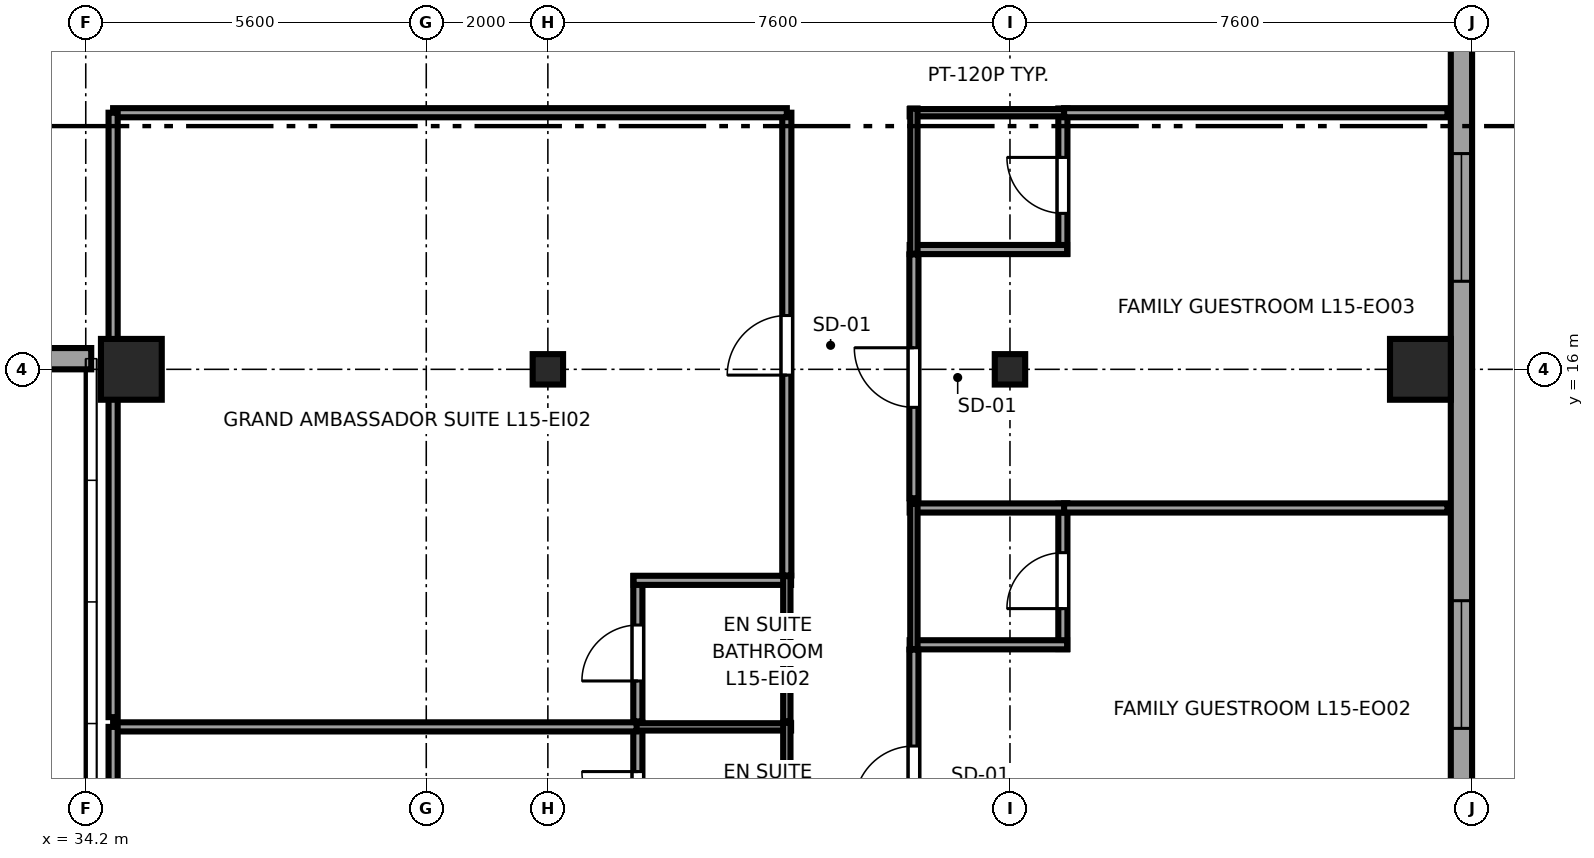
"""IFC4 building model, lengths in metres.
Left out: names, types, materials, properties, quantities, classifications, styles, units other than length and angle.
Written with IfcOpenShell. Run it as: python <this file> out.ifc"""

import sys

from ifc_helpers import new_model, si_unit, direction, frame, frame_2d, origin, origin_2d, place, context, subcontext, project, spatial, rectangle, i_section, extrude, source, transform, mapped, element, fill, save


model = new_model("IFC4")
c1 = context("Model", 3, precision=1e-05, world=origin(), true_north=direction((0.0, 1.0)))
c2 = subcontext(c1, "Body", "Model", "MODEL_VIEW")
j1 = project(units=[si_unit("LENGTHUNIT", "METRE"), si_unit("PLANEANGLEUNIT", "RADIAN")], contexts=[c1])
p1 = place(None, origin())
s1 = spatial("IfcSite", under=j1, at=p1, CompositionType="ELEMENT")
p2 = place(p1, origin())
s2 = spatial("IfcBuilding", under=s1, at=p2, CompositionType="ELEMENT")
p3 = place(p2, frame((0.0, 0.0, 63.95)))
s3 = spatial("IfcBuildingStorey", under=s2, at=p3, CompositionType="ELEMENT", Elevation=63.95)
m1 = source(origin(), c2, "Body", "SweptSolid", [
    extrude(rectangle(XDim=1.0, YDim=1.0, at=origin_2d()), origin(), (0.0, 0.0, 1.0), 3.55),
])
p4 = place(p3, frame((34.95, 16.0, 0.0), z_axis=(0.0, 0.0, 1.0), x_axis=(1.0, 0.0, 0.0)))
e1 = element("IfcColumn", 1, at=p4, inside=s3, PredefinedType="COLUMN", context=c2, shape_type="MappedRepresentation", body=[
    mapped(m1, transform((0.0, 0.0, 0.0), x_axis=(1.0, 0.0, 0.0), y_axis=(0.0, 1.0, 0.0), z_axis=(0.0, 0.0, 1.0), scale=1.0)),
])
m2 = source(origin(), c2, "Body", "SweptSolid", [
    extrude(i_section(OverallWidth=0.5, OverallDepth=0.5, WebThickness=0.028, FlangeThickness=0.045, at=origin_2d()), origin(), (0.0, 0.0, 1.0), 3.55),
])
for number, where, z_axis, x_axis in (
    (2, (41.8, 16.0, 0.0), (0.0, 0.0, 1.0), (1.0, 0.0, 0.0)),
    (3, (49.4, 16.0, 0.0), (0.0, 0.0, 1.0), (1.0, 0.0, 0.0)),
):
    element("IfcColumn", number, at=place(p3, frame(where, z_axis=z_axis, x_axis=x_axis)), inside=s3, PredefinedType="COLUMN", context=c2, shape_type="MappedRepresentation", body=[
        mapped(m2, transform((0.0, 0.0, 0.0), x_axis=(1.0, 0.0, 0.0), y_axis=(0.0, 1.0, 0.0), z_axis=(0.0, 0.0, 1.0), scale=1.0)),
    ])
p5 = place(p3, frame((56.15, 16.0, 0.0), z_axis=(0.0, 0.0, 1.0), x_axis=(1.0, 0.0, 0.0)))
e4 = element("IfcColumn", 4, at=p5, inside=s3, PredefinedType="COLUMN", context=c2, shape_type="MappedRepresentation", body=[
    mapped(m1, transform((0.0, 0.0, 0.0), x_axis=(1.0, 0.0, 0.0), y_axis=(0.0, 1.0, 0.0), z_axis=(0.0, 0.0, 1.0), scale=1.0)),
])
p6 = place(p3, frame((22.71, 16.175, 0.0), z_axis=(0.0, 0.0, 1.0), x_axis=(1.0, 0.0, 0.0)))
e5 = element("IfcWall", 5, at=p6, inside=s3, PredefinedType="SOLIDWALL", context=c2, shape_type="SweptSolid", body=[
    extrude(rectangle(XDim=11.58, YDim=0.35, at=frame_2d((5.79, 0.0))), origin(), (0.0, 0.0, 1.0), 2.748),
])
p7 = place(p6, frame((2.145, 0.0, 0.68)))
e6 = element("IfcOpeningElement", 6, at=p7, cuts=e5, PredefinedType="OPENING", context=c2, shape_type="SweptSolid", body=[
    extrude(rectangle(XDim=2.1, YDim=1.9, at=frame_2d((1.05, 0.95))), frame((0.0, 0.185, 0.0), z_axis=(0.0, -1.0, 0.0), x_axis=(1.0, 0.0, 0.0)), (0.0, 0.0, 1.0), 0.37),
])
p8 = place(p6, frame((7.335, 0.0, 0.68)))
e7 = element("IfcOpeningElement", 7, at=p8, cuts=e5, PredefinedType="OPENING", context=c2, shape_type="SweptSolid", body=[
    extrude(rectangle(XDim=2.1, YDim=1.9, at=frame_2d((1.05, 0.95))), frame((0.0, 0.185, 0.0), z_axis=(0.0, -1.0, 0.0), x_axis=(1.0, 0.0, 0.0)), (0.0, 0.0, 1.0), 0.37),
])
p9 = place(p3, frame((56.825, 4.617, 0.0), z_axis=(0.0, 0.0, 1.0), x_axis=(0.0, 1.0, 0.0)))
e8 = element("IfcWall", 8, at=p9, inside=s3, PredefinedType="SOLIDWALL", context=c2, shape_type="SweptSolid", body=[
    extrude(rectangle(XDim=36.766, YDim=0.35, at=frame_2d((18.383, 0.0))), origin(), (0.0, 0.0, 1.0), 3.37),
])
p10 = place(p9, frame((5.478, 0.0, 0.68)))
e9 = element("IfcOpeningElement", 9, at=p10, cuts=e8, PredefinedType="OPENING", context=c2, shape_type="SweptSolid", body=[
    extrude(rectangle(XDim=2.1, YDim=1.9, at=frame_2d((1.05, 0.95))), frame((0.0, 0.185, 0.0), z_axis=(0.0, -1.0, 0.0), x_axis=(1.0, 0.0, 0.0)), (0.0, 0.0, 1.0), 0.37),
])
p11 = place(p9, frame((12.831, 0.0, 0.68)))
e10 = element("IfcOpeningElement", 10, at=p11, cuts=e8, PredefinedType="OPENING", context=c2, shape_type="SweptSolid", body=[
    extrude(rectangle(XDim=2.1, YDim=1.9, at=frame_2d((1.05, 0.95))), frame((0.0, 0.185, 0.0), z_axis=(0.0, -1.0, 0.0), x_axis=(1.0, 0.0, 0.0)), (0.0, 0.0, 1.0), 0.37),
])
p12 = place(p9, frame((16.783, 0.0, 0.68)))
e11 = element("IfcOpeningElement", 11, at=p12, cuts=e8, PredefinedType="OPENING", context=c2, shape_type="SweptSolid", body=[
    extrude(rectangle(XDim=2.1, YDim=1.9, at=frame_2d((1.05, 0.95))), frame((0.0, 0.185, 0.0), z_axis=(0.0, -1.0, 0.0), x_axis=(1.0, 0.0, 0.0)), (0.0, 0.0, 1.0), 0.37),
])
p13 = place(p9, frame((25.236, 0.0, 0.68)))
e12 = element("IfcOpeningElement", 12, at=p13, cuts=e8, PredefinedType="OPENING", context=c2, shape_type="SweptSolid", body=[
    extrude(rectangle(XDim=2.1, YDim=1.9, at=frame_2d((1.05, 0.95))), frame((0.0, 0.185, 0.0), z_axis=(0.0, -1.0, 0.0), x_axis=(1.0, 0.0, 0.0)), (0.0, 0.0, 1.0), 0.37),
])
p14 = place(p9, frame((30.238, 0.0, 0.68)))
e13 = element("IfcOpeningElement", 13, at=p14, cuts=e8, PredefinedType="OPENING", context=c2, shape_type="SweptSolid", body=[
    extrude(rectangle(XDim=2.1, YDim=1.9, at=frame_2d((1.05, 0.95))), frame((0.0, 0.185, 0.0), z_axis=(0.0, -1.0, 0.0), x_axis=(1.0, 0.0, 0.0)), (0.0, 0.0, 1.0), 0.37),
])
p15 = place(p9, frame((33.14, 0.0, 0.68)))
e14 = element("IfcOpeningElement", 14, at=p15, cuts=e8, PredefinedType="OPENING", context=c2, shape_type="SweptSolid", body=[
    extrude(rectangle(XDim=2.1, YDim=1.9, at=frame_2d((1.05, 0.95))), frame((0.0, 0.185, 0.0), z_axis=(0.0, -1.0, 0.0), x_axis=(1.0, 0.0, 0.0)), (0.0, 0.0, 1.0), 0.37),
])
p16 = place(p9, frame((0.586, 0.0, 0.62)))
e15 = element("IfcOpeningElement", 15, at=p16, cuts=e8, PredefinedType="OPENING", context=c2, shape_type="SweptSolid", body=[
    extrude(rectangle(XDim=1.5, YDim=1.55, at=frame_2d((0.75, 0.775))), frame((0.0, 0.185, 0.0), z_axis=(0.0, -1.0, 0.0), x_axis=(1.0, 0.0, 0.0)), (0.0, 0.0, 1.0), 0.37),
])
p17 = place(p3, frame((43.28, 7.8, 0.0), z_axis=(0.0, 0.0, 1.0), x_axis=(0.0, 1.0, 0.0)))
e16 = element("IfcWall", 16, at=p17, inside=s3, PredefinedType="PARTITIONING", context=c2, shape_type="SweptSolid", body=[
    extrude(rectangle(XDim=2.39, YDim=0.15, at=frame_2d((1.195, 0.0))), origin(), (0.0, 0.0, 1.0), 3.37),
])
p18 = place(p17, frame((0.665, 0.0, 0.0)))
e17 = element("IfcOpeningElement", 17, at=p18, cuts=e16, PredefinedType="OPENING", context=c2, shape_type="SweptSolid", body=[
    extrude(rectangle(XDim=0.92, YDim=2.01, at=frame_2d((0.46, 1.005))), frame((0.0, 0.085, 0.0), z_axis=(0.0, -1.0, 0.0), x_axis=(1.0, 0.0, 0.0)), (0.0, 0.0, 1.0), 0.17),
])
p19 = place(p3, frame((43.21, 10.12, 0.0), z_axis=(0.0, 0.0, 1.0), x_axis=(1.0, 0.0, 0.0)))
e18 = element("IfcWall", 18, at=p19, inside=s3, PredefinedType="PLUMBINGWALL", context=c2, shape_type="SweptSolid", body=[
    extrude(rectangle(XDim=2.59, YDim=0.12, at=frame_2d((1.295, 0.0))), origin(), (0.0, 0.0, 1.0), 3.37),
])
p20 = place(p3, frame((45.73, 7.8, 0.0), z_axis=(0.0, 0.0, 1.0), x_axis=(0.0, 1.0, 0.0)))
e19 = element("IfcWall", 19, at=p20, inside=s3, PredefinedType="PLUMBINGWALL", context=c2, shape_type="SweptSolid", body=[
    extrude(rectangle(XDim=2.39, YDim=0.12, at=frame_2d((1.195, 0.0))), origin(), (0.0, 0.0, 1.0), 2.954),
])
p21 = place(p3, frame((43.28, 10.21, 0.0), z_axis=(0.0, 0.0, 1.0), x_axis=(0.0, 1.0, 0.0)))
e20 = element("IfcWall", 20, at=p21, inside=s3, PredefinedType="PARTITIONING", context=c2, shape_type="SweptSolid", body=[
    extrude(rectangle(XDim=2.39, YDim=0.15, at=frame_2d((1.195, 0.0))), origin(), (0.0, 0.0, 1.0), 3.37),
])
p22 = place(p21, frame((0.665, 0.0, 0.0)))
e21 = element("IfcOpeningElement", 21, at=p22, cuts=e20, PredefinedType="OPENING", context=c2, shape_type="SweptSolid", body=[
    extrude(rectangle(XDim=0.92, YDim=2.01, at=frame_2d((0.46, 1.005))), frame((0.0, 0.085, 0.0), z_axis=(0.0, -1.0, 0.0), x_axis=(1.0, 0.0, 0.0)), (0.0, 0.0, 1.0), 0.17),
])
p23 = place(p3, frame((43.21, 12.53, 0.0), z_axis=(0.0, 0.0, 1.0), x_axis=(1.0, 0.0, 0.0)))
e22 = element("IfcWall", 22, at=p23, inside=s3, PredefinedType="PARTITIONING", context=c2, shape_type="SweptSolid", body=[
    extrude(rectangle(XDim=2.59, YDim=0.15, at=frame_2d((1.295, 0.0))), origin(), (0.0, 0.0, 1.0), 3.37),
])
p24 = place(p3, frame((45.73, 10.21, 0.0), z_axis=(0.0, 0.0, 1.0), x_axis=(0.0, 1.0, 0.0)))
e23 = element("IfcWall", 23, at=p24, inside=s3, PredefinedType="PLUMBINGWALL", context=c2, shape_type="SweptSolid", body=[
    extrude(rectangle(XDim=2.39, YDim=0.12, at=frame_2d((1.195, 0.0))), origin(), (0.0, 0.0, 1.0), 2.954),
])
p25 = place(p3, frame((50.27, 11.4, 0.0), z_axis=(0.0, 0.0, 1.0), x_axis=(0.0, 1.0, 0.0)))
e24 = element("IfcWall", 24, at=p25, inside=s3, PredefinedType="PARTITIONING", context=c2, shape_type="SweptSolid", body=[
    extrude(rectangle(XDim=2.39, YDim=0.15, at=frame_2d((1.195, 0.0))), origin(), (0.0, 0.0, 1.0), 3.37),
])
p26 = place(p25, frame((0.665, 0.0, 0.0)))
e25 = element("IfcOpeningElement", 25, at=p26, cuts=e24, PredefinedType="OPENING", context=c2, shape_type="SweptSolid", body=[
    extrude(rectangle(XDim=0.92, YDim=2.01, at=frame_2d((0.46, 1.005))), frame((0.0, 0.085, 0.0), z_axis=(0.0, -1.0, 0.0), x_axis=(1.0, 0.0, 0.0)), (0.0, 0.0, 1.0), 0.17),
])
for number, where, z_axis, x_axis in (
    (26, (47.75, 11.47, 0.0), (0.0, 0.0, 1.0), (1.0, 0.0, 0.0)),
    (27, (47.75, 13.72, 0.0), (0.0, 0.0, 1.0), (1.0, 0.0, 0.0)),
):
    element("IfcWall", number, at=place(p3, frame(where, z_axis=z_axis, x_axis=x_axis)), inside=s3, PredefinedType="PARTITIONING", context=c2, shape_type="SweptSolid", body=[
        extrude(rectangle(XDim=2.59, YDim=0.15, at=frame_2d((1.295, 0.0))), origin(), (0.0, 0.0, 1.0), 3.37),
    ])
p27 = place(p3, frame((47.82, 11.4, 0.0), z_axis=(0.0, 0.0, 1.0), x_axis=(0.0, 1.0, 0.0)))
e28 = element("IfcWall", 28, at=p27, inside=s3, PredefinedType="PLUMBINGWALL", context=c2, shape_type="SweptSolid", body=[
    extrude(rectangle(XDim=2.39, YDim=0.12, at=frame_2d((1.195, 0.0))), origin(), (0.0, 0.0, 1.0), 3.37),
])
p28 = place(p3, frame((50.27, 17.9, 0.0), z_axis=(0.0, 0.0, 1.0), x_axis=(0.0, 1.0, 0.0)))
e29 = element("IfcWall", 29, at=p28, inside=s3, PredefinedType="PARTITIONING", context=c2, shape_type="SweptSolid", body=[
    extrude(rectangle(XDim=2.39, YDim=0.15, at=frame_2d((1.195, 0.0))), origin(), (0.0, 0.0, 1.0), 3.37),
])
p29 = place(p28, frame((0.665, 0.0, 0.0)))
e30 = element("IfcOpeningElement", 30, at=p29, cuts=e29, PredefinedType="OPENING", context=c2, shape_type="SweptSolid", body=[
    extrude(rectangle(XDim=0.92, YDim=2.01, at=frame_2d((0.46, 1.005))), frame((0.0, 0.085, 0.0), z_axis=(0.0, -1.0, 0.0), x_axis=(1.0, 0.0, 0.0)), (0.0, 0.0, 1.0), 0.17),
])
p30 = place(p3, frame((47.75, 17.97, 0.0), z_axis=(0.0, 0.0, 1.0), x_axis=(1.0, 0.0, 0.0)))
e31 = element("IfcWall", 31, at=p30, inside=s3, PredefinedType="PARTITIONING", context=c2, shape_type="SweptSolid", body=[
    extrude(rectangle(XDim=2.59, YDim=0.15, at=frame_2d((1.295, 0.0))), origin(), (0.0, 0.0, 1.0), 3.37),
])
p31 = place(p3, frame((47.75, 20.22, 0.0), z_axis=(0.0, 0.0, 1.0), x_axis=(1.0, 0.0, 0.0)))
e32 = element("IfcWall", 32, at=p31, inside=s3, PredefinedType="PLUMBINGWALL", context=c2, shape_type="SweptSolid", body=[
    extrude(rectangle(XDim=2.59, YDim=0.12, at=frame_2d((1.295, 0.0))), origin(), (0.0, 0.0, 1.0), 3.37),
])
p32 = place(p3, frame((47.82, 17.9, 0.0), z_axis=(0.0, 0.0, 1.0), x_axis=(0.0, 1.0, 0.0)))
e33 = element("IfcWall", 33, at=p32, inside=s3, PredefinedType="PLUMBINGWALL", context=c2, shape_type="SweptSolid", body=[
    extrude(rectangle(XDim=2.39, YDim=0.12, at=frame_2d((1.195, 0.0))), origin(), (0.0, 0.0, 1.0), 3.37),
])
p33 = place(p3, frame((34.65, 10.12, 0.0), z_axis=(0.0, 0.0, 1.0), x_axis=(1.0, 0.0, 0.0)))
e34 = element("IfcWall", 34, at=p33, inside=s3, PredefinedType="PARTITIONING", context=c2, shape_type="SweptSolid", body=[
    extrude(rectangle(XDim=8.61, YDim=0.15, at=frame_2d((4.305, 0.0))), origin(), (0.0, 0.0, 1.0), 3.37),
])
p34 = place(p3, frame((34.65, 0.405, 0.0), z_axis=(0.0, 0.0, 1.0), x_axis=(0.0, 1.0, 0.0)))
e35 = element("IfcWall", 35, at=p34, inside=s3, PredefinedType="PARTITIONING", context=c2, shape_type="SweptSolid", body=[
    extrude(rectangle(XDim=9.715, YDim=0.15, at=frame_2d((4.857, 0.0))), origin(), (0.0, 0.0, 1.0), 3.37),
])
p35 = place(p3, frame((45.73, 12.61, 0.0), z_axis=(0.0, 0.0, 1.0), x_axis=(0.0, 1.0, 0.0)))
e36 = element("IfcWall", 36, at=p35, inside=s3, PredefinedType="PARTITIONING", context=c2, shape_type="SweptSolid", body=[
    extrude(rectangle(XDim=7.61, YDim=0.15, at=frame_2d((3.805, 0.0))), origin(), (0.0, 0.0, 1.0), 2.954),
])
p36 = place(p35, frame((3.295, 0.0, 0.0)))
e37 = element("IfcOpeningElement", 37, at=p36, cuts=e36, PredefinedType="OPENING", context=c2, shape_type="SweptSolid", body=[
    extrude(rectangle(XDim=0.98, YDim=2.12, at=frame_2d((0.49, 1.06))), frame((0.0, 0.085, 0.0), z_axis=(0.0, -1.0, 0.0), x_axis=(1.0, 0.0, 0.0)), (0.0, 0.0, 1.0), 0.17),
])
p37 = place(p3, frame((34.65, 20.22, 0.0), z_axis=(0.0, 0.0, 1.0), x_axis=(1.0, 0.0, 0.0)))
e38 = element("IfcWall", 38, at=p37, inside=s3, PredefinedType="PARTITIONING", context=c2, shape_type="SweptSolid", body=[
    extrude(rectangle(XDim=11.08, YDim=0.15, at=frame_2d((5.54, 0.0))), origin(), (0.0, 0.0, 1.0), 2.954),
])
p38 = place(p3, frame((34.65, 10.28, 0.0), z_axis=(0.0, 0.0, 1.0), x_axis=(0.0, 1.0, 0.0)))
e39 = element("IfcWall", 39, at=p38, inside=s3, PredefinedType="PARTITIONING", context=c2, shape_type="SweptSolid", body=[
    extrude(rectangle(XDim=9.94, YDim=0.15, at=frame_2d((4.97, 0.0))), origin(), (0.0, 0.0, 1.0), 3.37),
])
p39 = place(p3, frame((47.82, 7.28, 0.0), z_axis=(0.0, 0.0, 1.0), x_axis=(0.0, 1.0, 0.0)))
e40 = element("IfcWall", 40, at=p39, inside=s3, PredefinedType="PARTITIONING", context=c2, shape_type="SweptSolid", body=[
    extrude(rectangle(XDim=4.11, YDim=0.15, at=frame_2d((2.055, 0.0))), origin(), (0.0, 0.0, 1.0), 3.37),
])
p40 = place(p39, frame((1.545, 0.0, 0.0)))
e41 = element("IfcOpeningElement", 41, at=p40, cuts=e40, PredefinedType="OPENING", context=c2, shape_type="SweptSolid", body=[
    extrude(rectangle(XDim=0.98, YDim=2.12, at=frame_2d((0.49, 1.06))), frame((0.0, 0.085, 0.0), z_axis=(0.0, -1.0, 0.0), x_axis=(1.0, 0.0, 0.0)), (0.0, 0.0, 1.0), 0.17),
])
p41 = place(p3, frame((50.29, 13.72, 0.0), z_axis=(0.0, 0.0, 1.0), x_axis=(1.0, 0.0, 0.0)))
e42 = element("IfcWall", 42, at=p41, inside=s3, PredefinedType="PARTITIONING", context=c2, shape_type="SweptSolid", body=[
    extrude(rectangle(XDim=6.305, YDim=0.15, at=frame_2d((3.152, 0.0))), origin(), (0.0, 0.0, 1.0), 3.37),
])
p42 = place(p3, frame((47.82, 13.88, 0.0), z_axis=(0.0, 0.0, 1.0), x_axis=(0.0, 1.0, 0.0)))
e43 = element("IfcWall", 43, at=p42, inside=s3, PredefinedType="PARTITIONING", context=c2, shape_type="SweptSolid", body=[
    extrude(rectangle(XDim=4.01, YDim=0.15, at=frame_2d((2.005, 0.0))), origin(), (0.0, 0.0, 1.0), 3.37),
])
p43 = place(p42, frame((1.495, 0.0, 0.0)))
e44 = element("IfcOpeningElement", 44, at=p43, cuts=e43, PredefinedType="OPENING", context=c2, shape_type="SweptSolid", body=[
    extrude(rectangle(XDim=0.98, YDim=2.12, at=frame_2d((0.49, 1.06))), frame((0.0, 0.085, 0.0), z_axis=(0.0, -1.0, 0.0), x_axis=(1.0, 0.0, 0.0)), (0.0, 0.0, 1.0), 0.17),
])
p44 = place(p3, frame((50.29, 20.22, 0.0), z_axis=(0.0, 0.0, 1.0), x_axis=(1.0, 0.0, 0.0)))
e45 = element("IfcWall", 45, at=p44, inside=s3, PredefinedType="PARTITIONING", context=c2, shape_type="SweptSolid", body=[
    extrude(rectangle(XDim=6.305, YDim=0.15, at=frame_2d((3.152, 0.0))), origin(), (0.0, 0.0, 1.0), 3.37),
])
m3 = source(origin(), c2, "Body", "SweptSolid", [
    extrude(rectangle(XDim=2.1, YDim=1.9, at=frame_2d((1.05, 0.95))), frame((0.0, 0.09, 0.0), z_axis=(0.0, -1.0, 0.0), x_axis=(1.0, 0.0, 0.0)), (0.0, 0.0, 1.0), 0.06),
])
p45 = place(p10, origin())
e46 = element("IfcWindow", 46, at=p45, inside=s3, PartitioningType="TRIPLE_PANEL_HORIZONTAL", PredefinedType="WINDOW", context=c2, shape_type="MappedRepresentation", body=[
    mapped(m3, transform((0.0, 0.0, 0.0), x_axis=(1.0, 0.0, 0.0), y_axis=(0.0, 1.0, 0.0), z_axis=(0.0, 0.0, 1.0), scale=1.0)),
])
fill(e9, e46)
p46 = place(p11, origin())
e47 = element("IfcWindow", 47, at=p46, inside=s3, PartitioningType="TRIPLE_PANEL_HORIZONTAL", PredefinedType="WINDOW", context=c2, shape_type="MappedRepresentation", body=[
    mapped(m3, transform((0.0, 0.0, 0.0), x_axis=(1.0, 0.0, 0.0), y_axis=(0.0, 1.0, 0.0), z_axis=(0.0, 0.0, 1.0), scale=1.0)),
])
fill(e10, e47)
m4 = source(origin(), c2, "Body", "SweptSolid", [
    extrude(rectangle(XDim=0.92, YDim=2.01, at=frame_2d((0.46, 1.005))), frame((0.0, 0.025, 0.0), z_axis=(0.0, -1.0, 0.0), x_axis=(1.0, 0.0, 0.0)), (0.0, 0.0, 1.0), 0.05),
])
p47 = place(p18, origin())
e48 = element("IfcDoor", 48, at=p47, inside=s3, OperationType="SINGLE_SWING_RIGHT", PredefinedType="DOOR", context=c2, shape_type="MappedRepresentation", body=[
    mapped(m4, transform((0.0, 0.0, 0.0), x_axis=(1.0, 0.0, 0.0), y_axis=(0.0, 1.0, 0.0), z_axis=(0.0, 0.0, 1.0), scale=1.0)),
])
fill(e17, e48)
p48 = place(p22, origin())
e49 = element("IfcDoor", 49, at=p48, inside=s3, OperationType="SINGLE_SWING_LEFT", PredefinedType="DOOR", context=c2, shape_type="MappedRepresentation", body=[
    mapped(m4, transform((0.0, 0.0, 0.0), x_axis=(1.0, 0.0, 0.0), y_axis=(0.0, 1.0, 0.0), z_axis=(0.0, 0.0, 1.0), scale=1.0)),
])
fill(e21, e49)
p49 = place(p26, origin())
e50 = element("IfcDoor", 50, at=p49, inside=s3, OperationType="SINGLE_SWING_LEFT", PredefinedType="DOOR", context=c2, shape_type="MappedRepresentation", body=[
    mapped(m4, transform((0.0, 0.0, 0.0), x_axis=(1.0, 0.0, 0.0), y_axis=(0.0, 1.0, 0.0), z_axis=(0.0, 0.0, 1.0), scale=1.0)),
])
fill(e25, e50)
p50 = place(p29, origin())
e51 = element("IfcDoor", 51, at=p50, inside=s3, OperationType="SINGLE_SWING_RIGHT", PredefinedType="DOOR", context=c2, shape_type="MappedRepresentation", body=[
    mapped(m4, transform((0.0, 0.0, 0.0), x_axis=(1.0, 0.0, 0.0), y_axis=(0.0, 1.0, 0.0), z_axis=(0.0, 0.0, 1.0), scale=1.0)),
])
fill(e30, e51)
m5 = source(origin(), c2, "Body", "SweptSolid", [
    extrude(rectangle(XDim=0.98, YDim=2.12, at=frame_2d((0.49, 1.06))), frame((0.0, 0.025, 0.0), z_axis=(0.0, -1.0, 0.0), x_axis=(1.0, 0.0, 0.0)), (0.0, 0.0, 1.0), 0.05),
])
p51 = place(p36, origin())
e52 = element("IfcDoor", 52, at=p51, inside=s3, OperationType="SINGLE_SWING_LEFT", PredefinedType="DOOR", context=c2, shape_type="MappedRepresentation", body=[
    mapped(m5, transform((0.0, 0.0, 0.0), x_axis=(1.0, 0.0, 0.0), y_axis=(0.0, 1.0, 0.0), z_axis=(0.0, 0.0, 1.0), scale=1.0)),
])
fill(e37, e52)
p52 = place(p40, origin())
e53 = element("IfcDoor", 53, at=p52, inside=s3, OperationType="SINGLE_SWING_LEFT", PredefinedType="DOOR", context=c2, shape_type="MappedRepresentation", body=[
    mapped(m5, transform((0.0, 0.0, 0.0), x_axis=(1.0, 0.0, 0.0), y_axis=(0.0, 1.0, 0.0), z_axis=(0.0, 0.0, 1.0), scale=1.0)),
])
fill(e41, e53)
p53 = place(p43, origin())
e54 = element("IfcDoor", 54, at=p53, inside=s3, OperationType="SINGLE_SWING_RIGHT", PredefinedType="DOOR", context=c2, shape_type="MappedRepresentation", body=[
    mapped(m5, transform((0.0, 0.0, 0.0), x_axis=(1.0, 0.0, 0.0), y_axis=(0.0, 1.0, 0.0), z_axis=(0.0, 0.0, 1.0), scale=1.0)),
])
fill(e44, e54)
save(model, sys.argv[1])
